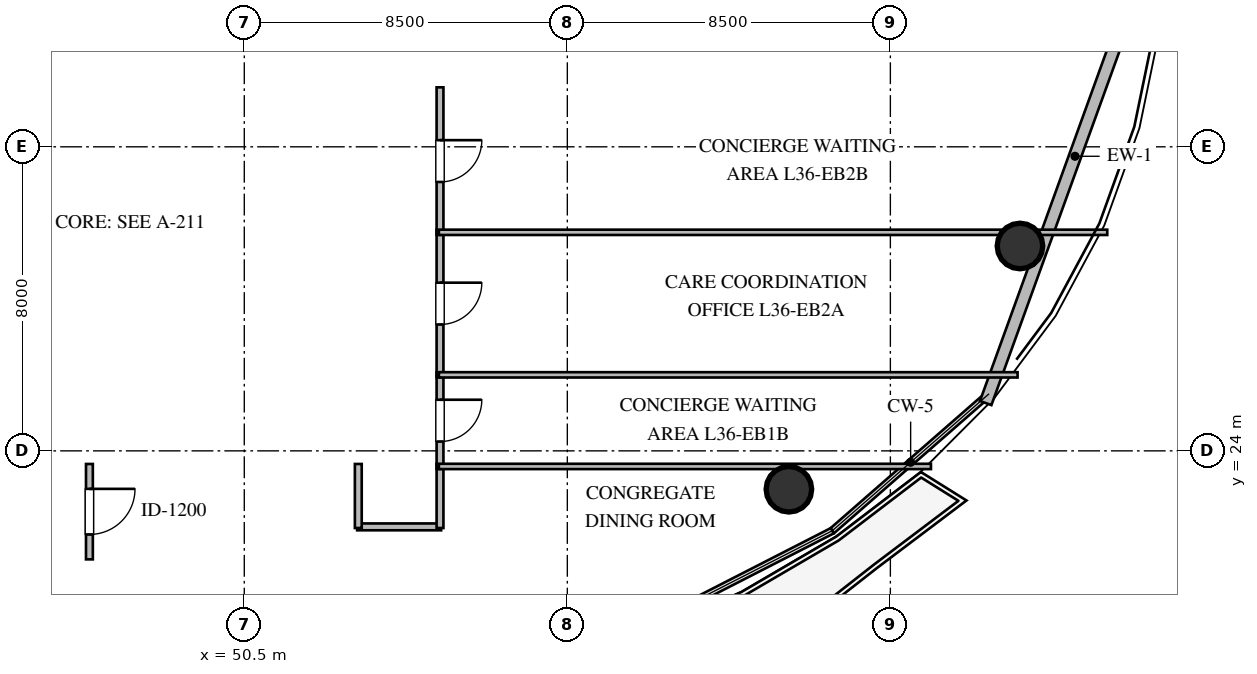
"""IFC4 building model, lengths in metres.
Left out: names, types, materials, properties, quantities, classifications, styles, units other than length and angle.
Written with IfcOpenShell. Run it as: python <this file> out.ifc"""

import sys

from ifc_helpers import new_model, si_unit, direction, frame, frame_2d, origin, origin_2d, place, context, subcontext, project, spatial, rectangle, circle, extrude, element, fill, save


model = new_model("IFC4")
c1 = context("Model", 3, precision=1e-05, world=origin(), true_north=direction((0.0, 1.0)))
c2 = subcontext(c1, "Body", "Model", "MODEL_VIEW")
j1 = project(units=[si_unit("LENGTHUNIT", "METRE"), si_unit("PLANEANGLEUNIT", "RADIAN")], contexts=[c1])
p1 = place(None, origin())
s1 = spatial("IfcSite", under=j1, at=p1, CompositionType="ELEMENT")
p2 = place(p1, origin())
s2 = spatial("IfcBuilding", under=s1, at=p2, CompositionType="ELEMENT")
p3 = place(p2, frame((0.0, 0.0, 138.6)))
s3 = spatial("IfcBuildingStorey", under=s2, at=p3, CompositionType="ELEMENT", Elevation=138.6)
for number, where, z_axis, x_axis in (
    (1, (64.83, 22.99, 0.0), (0.0, 0.0, 1.0), (1.0, 0.0, 0.0)),
    (2, (70.91, 29.39, 0.0), (0.0, 0.0, 1.0), (1.0, 0.0, 0.0)),
):
    element("IfcColumn", number, at=place(p3, frame(where, z_axis=z_axis, x_axis=x_axis)), inside=s3, PredefinedType="COLUMN", context=c2, shape_type="SweptSolid", body=[
        extrude(circle(Radius=0.6, at=origin_2d()), origin(), (0.0, 0.0, 1.0), 3.6),
    ])
p4 = place(p3, frame((74.708, 38.244, 0.0), z_axis=(0.0, 0.0, 1.0), x_axis=(-0.340324669139, -0.94030799187, 0.0)))
e3 = element("IfcWall", 3, at=p4, inside=s3, PredefinedType="STANDARD", context=c2, shape_type="SweptSolid", body=[
    extrude(rectangle(XDim=13.81, YDim=0.32, at=frame_2d((6.905, 0.0))), origin(), (0.0, 0.0, 1.0), 3.36),
])
p5 = place(p3, frame((46.425, 23.655, 0.0), z_axis=(0.0, 0.0, 1.0), x_axis=(0.0, -1.0, 0.0)))
e4 = element("IfcWall", 4, at=p5, inside=s3, PredefinedType="PARTITIONING", context=c2, shape_type="SweptSolid", body=[
    extrude(rectangle(XDim=2.51, YDim=0.18, at=frame_2d((1.255, 0.0))), origin(), (0.0, 0.0, 1.0), 3.36),
])
p6 = place(p5, frame((0.655, 0.0, 0.0)))
e5 = element("IfcOpeningElement", 5, at=p6, cuts=e4, PredefinedType="OPENING", context=c2, shape_type="SweptSolid", body=[
    extrude(rectangle(XDim=1.2, YDim=2.15, at=frame_2d((0.6, 1.075))), frame((0.0, 0.1, 0.0), z_axis=(0.0, -1.0, 0.0), x_axis=(1.0, 0.0, 0.0)), (0.0, 0.0, 1.0), 0.2),
])
p7 = place(p3, frame((55.68, 22.0, 0.0), z_axis=(0.0, 0.0, 1.0), x_axis=(-1.0, 0.0, 0.0)))
e6 = element("IfcWall", 6, at=p7, inside=s3, PredefinedType="PARTITIONING", context=c2, shape_type="SweptSolid", body=[
    extrude(rectangle(XDim=2.21, YDim=0.18, at=frame_2d((1.105, 0.0))), origin(), (0.0, 0.0, 1.0), 3.36),
])
for number, where, z_axis, x_axis in (
    (7, (55.65, 23.655, 0.0), (0.0, 0.0, 1.0), (0.0, -1.0, 0.0)),
    (8, (53.5, 21.97, 0.0), (0.0, 0.0, 1.0), (0.0, 1.0, 0.0)),
):
    element("IfcWall", number, at=place(p3, frame(where, z_axis=z_axis, x_axis=x_axis)), inside=s3, PredefinedType="PARTITIONING", context=c2, shape_type="SweptSolid", body=[
        extrude(rectangle(XDim=1.685, YDim=0.18, at=frame_2d((0.843, 0.0))), origin(), (0.0, 0.0, 1.0), 3.36),
    ])
p8 = place(p3, frame((55.65, 26.065, 0.0), z_axis=(0.0, 0.0, 1.0), x_axis=(0.0, -1.0, 0.0)))
e9 = element("IfcWall", 9, at=p8, inside=s3, PredefinedType="PARTITIONING", context=c2, shape_type="SweptSolid", body=[
    extrude(rectangle(XDim=2.54, YDim=0.18, at=frame_2d((1.27, 0.0))), origin(), (0.0, 0.0, 1.0), 3.36),
])
p9 = place(p8, frame((0.72, 0.0, 0.0)))
e10 = element("IfcOpeningElement", 10, at=p9, cuts=e9, PredefinedType="OPENING", context=c2, shape_type="SweptSolid", body=[
    extrude(rectangle(XDim=1.1, YDim=2.1, at=frame_2d((0.55, 1.05))), frame((0.0, 0.1, 0.0), z_axis=(0.0, -1.0, 0.0), x_axis=(1.0, 0.0, 0.0)), (0.0, 0.0, 1.0), 0.2),
])
p10 = place(p3, frame((55.65, 29.815, 0.0), z_axis=(0.0, 0.0, 1.0), x_axis=(0.0, -1.0, 0.0)))
e11 = element("IfcWall", 11, at=p10, inside=s3, PredefinedType="PARTITIONING", context=c2, shape_type="SweptSolid", body=[
    extrude(rectangle(XDim=3.88, YDim=0.18, at=frame_2d((1.94, 0.0))), origin(), (0.0, 0.0, 1.0), 3.36),
])
p11 = place(p10, frame((1.39, 0.0, 0.0)))
e12 = element("IfcOpeningElement", 12, at=p11, cuts=e11, PredefinedType="OPENING", context=c2, shape_type="SweptSolid", body=[
    extrude(rectangle(XDim=1.1, YDim=2.1, at=frame_2d((0.55, 1.05))), frame((0.0, 0.1, 0.0), z_axis=(0.0, -1.0, 0.0), x_axis=(1.0, 0.0, 0.0)), (0.0, 0.0, 1.0), 0.2),
])
p12 = place(p3, frame((55.65, 33.565, 0.0), z_axis=(0.0, 0.0, 1.0), x_axis=(0.0, -1.0, 0.0)))
e13 = element("IfcWall", 13, at=p12, inside=s3, PredefinedType="PARTITIONING", context=c2, shape_type="SweptSolid", body=[
    extrude(rectangle(XDim=3.88, YDim=0.18, at=frame_2d((1.94, 0.0))), origin(), (0.0, 0.0, 1.0), 3.36),
])
p13 = place(p12, frame((1.39, 0.0, 0.0)))
e14 = element("IfcOpeningElement", 14, at=p13, cuts=e13, PredefinedType="OPENING", context=c2, shape_type="SweptSolid", body=[
    extrude(rectangle(XDim=1.1, YDim=2.1, at=frame_2d((0.55, 1.05))), frame((0.0, 0.1, 0.0), z_axis=(0.0, -1.0, 0.0), x_axis=(1.0, 0.0, 0.0)), (0.0, 0.0, 1.0), 0.2),
])
p14 = place(p3, frame((55.62, 23.59, 0.0), z_axis=(0.0, 0.0, 1.0), x_axis=(1.0, 0.0, 0.0)))
e15 = element("IfcWall", 15, at=p14, inside=s3, PredefinedType="PARTITIONING", context=c2, shape_type="SweptSolid", body=[
    extrude(rectangle(XDim=12.948, YDim=0.14, at=frame_2d((6.474, 0.0))), origin(), (0.0, 0.0, 1.0), 2.806),
])
p15 = place(p3, frame((55.62, 26.0, 0.0), z_axis=(0.0, 0.0, 1.0), x_axis=(1.0, 0.0, 0.0)))
e16 = element("IfcWall", 16, at=p15, inside=s3, PredefinedType="PARTITIONING", context=c2, shape_type="SweptSolid", body=[
    extrude(rectangle(XDim=15.227, YDim=0.14, at=frame_2d((7.613, 0.0))), origin(), (0.0, 0.0, 1.0), 2.806),
])
p16 = place(p3, frame((55.62, 29.75, 0.0), z_axis=(0.0, 0.0, 1.0), x_axis=(1.0, 0.0, 0.0)))
e17 = element("IfcWall", 17, at=p16, inside=s3, PredefinedType="PARTITIONING", context=c2, shape_type="SweptSolid", body=[
    extrude(rectangle(XDim=17.587, YDim=0.14, at=frame_2d((8.793, 0.0))), origin(), (0.0, 0.0, 1.0), 2.806),
])
p17 = place(p6, origin())
e18 = element("IfcDoor", 18, at=p17, inside=s3, OperationType="SINGLE_SWING_LEFT", PredefinedType="DOOR", context=c2, shape_type="SweptSolid", body=[
    extrude(rectangle(XDim=1.2, YDim=2.15, at=frame_2d((0.6, 1.075))), frame((0.0, 0.025, 0.0), z_axis=(0.0, -1.0, 0.0), x_axis=(1.0, 0.0, 0.0)), (0.0, 0.0, 1.0), 0.05),
])
fill(e5, e18)
p18 = place(p9, origin())
e19 = element("IfcDoor", 19, at=p18, inside=s3, OperationType="SINGLE_SWING_LEFT", PredefinedType="DOOR", context=c2, shape_type="SweptSolid", body=[
    extrude(rectangle(XDim=1.1, YDim=2.1, at=frame_2d((0.55, 1.05))), frame((0.0, 0.025, 0.0), z_axis=(0.0, -1.0, 0.0), x_axis=(1.0, 0.0, 0.0)), (0.0, 0.0, 1.0), 0.05),
])
fill(e10, e19)
p19 = place(p11, origin())
e20 = element("IfcDoor", 20, at=p19, inside=s3, OperationType="SINGLE_SWING_LEFT", PredefinedType="DOOR", context=c2, shape_type="SweptSolid", body=[
    extrude(rectangle(XDim=1.1, YDim=2.1, at=frame_2d((0.55, 1.05))), frame((0.0, 0.025, 0.0), z_axis=(0.0, -1.0, 0.0), x_axis=(1.0, 0.0, 0.0)), (0.0, 0.0, 1.0), 0.05),
])
fill(e12, e20)
p20 = place(p13, origin())
e21 = element("IfcDoor", 21, at=p20, inside=s3, OperationType="SINGLE_SWING_LEFT", PredefinedType="DOOR", context=c2, shape_type="SweptSolid", body=[
    extrude(rectangle(XDim=1.1, YDim=2.1, at=frame_2d((0.55, 1.05))), frame((0.0, 0.025, 0.0), z_axis=(0.0, -1.0, 0.0), x_axis=(1.0, 0.0, 0.0)), (0.0, 0.0, 1.0), 0.05),
])
fill(e14, e21)
save(model, sys.argv[1])
